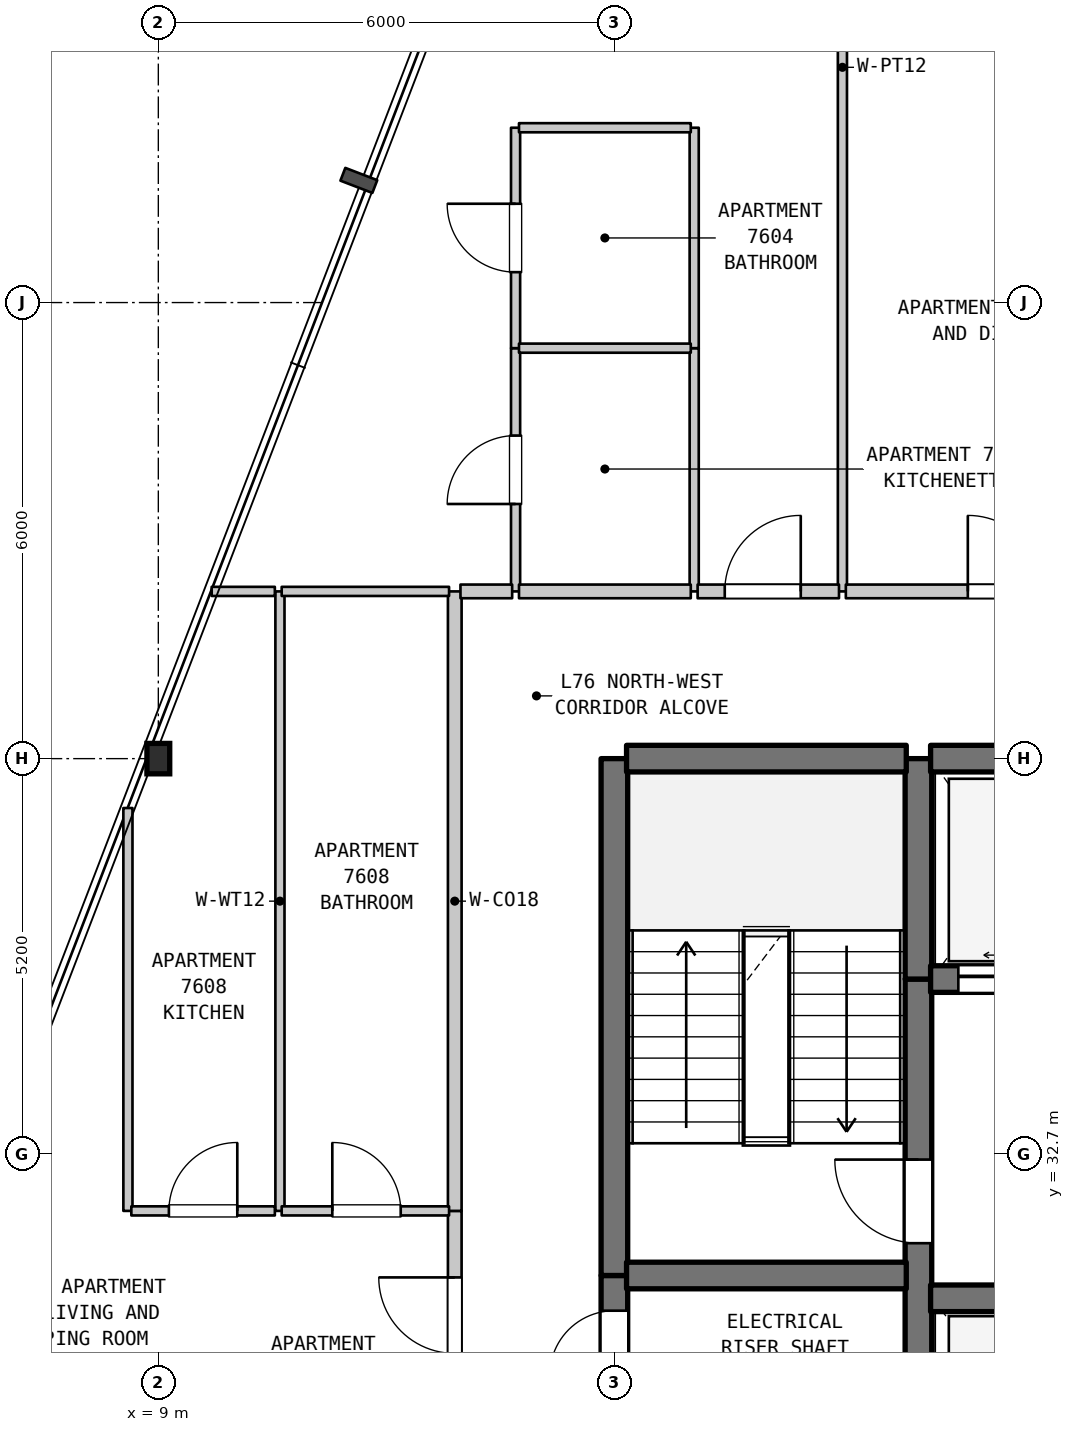
"""IFC4 building model, lengths in metres.
Left out: names, types, materials, properties, quantities, classifications, styles, units other than length and angle.
Written with IfcOpenShell. Run it as: python <this file> out.ifc"""

import sys

from ifc_helpers import new_model, si_unit, direction, frame, frame_2d, origin, origin_2d, place, context, subcontext, project, spatial, rectangle, i_section, extrude, element, fill, save


model = new_model("IFC4")
c1 = context("Model", 3, precision=1e-05, world=origin(), true_north=direction((0.0, 1.0)))
c2 = subcontext(c1, "Body", "Model", "MODEL_VIEW")
j1 = project(units=[si_unit("LENGTHUNIT", "METRE"), si_unit("PLANEANGLEUNIT", "RADIAN")], contexts=[c1])
p1 = place(None, origin())
s1 = spatial("IfcSite", under=j1, at=p1, CompositionType="ELEMENT")
p2 = place(p1, origin())
s2 = spatial("IfcBuilding", under=s1, at=p2, CompositionType="ELEMENT")
p3 = place(p2, frame((0.0, 0.0, 303.6)))
s3 = spatial("IfcBuildingStorey", under=s2, at=p3, CompositionType="ELEMENT", Elevation=303.6)
p4 = place(p3, frame((9.0, 37.9, 0.0), z_axis=(0.0, 0.0, 1.0), x_axis=(1.0, 0.0, 0.0)))
e1 = element("IfcColumn", 1, at=p4, inside=s3, PredefinedType="COLUMN", context=c2, shape_type="SweptSolid", body=[
    extrude(i_section(OverallWidth=0.3, OverallDepth=0.4, WebThickness=0.013, FlangeThickness=0.024, FilletRadius=0.027, at=origin_2d()), origin(), (0.0, 0.0, 1.0), 3.7),
])
p5 = place(p3, frame((8.6, 31.95, 0.0), z_axis=(0.0, 0.0, 1.0), x_axis=(0.0, 1.0, 0.0)))
e2 = element("IfcWall", 2, at=p5, inside=s3, PredefinedType="PARTITIONING", context=c2, shape_type="SweptSolid", body=[
    extrude(rectangle(XDim=5.3, YDim=0.12, at=frame_2d((2.65, 0.0))), origin(), (0.0, 0.0, 1.0), 3.39),
])
p6 = place(p3, frame((10.6, 31.95, 0.0), z_axis=(0.0, 0.0, 1.0), x_axis=(0.0, 1.0, 0.0)))
e3 = element("IfcWall", 3, at=p6, inside=s3, PredefinedType="PARTITIONING", context=c2, shape_type="SweptSolid", body=[
    extrude(rectangle(XDim=8.15, YDim=0.12, at=frame_2d((4.075, 0.0))), origin(), (0.0, 0.0, 1.0), 3.39),
])
p7 = place(p3, frame((12.9, 29.2, 0.0), z_axis=(0.0, 0.0, 1.0), x_axis=(0.0, 1.0, 0.0)))
e4 = element("IfcWall", 4, at=p7, inside=s3, PredefinedType="STANDARD", context=c2, shape_type="SweptSolid", body=[
    extrude(rectangle(XDim=2.75, YDim=0.18, at=frame_2d((1.375, 0.0))), origin(), (0.0, 0.0, 1.0), 3.39),
])
p8 = place(p7, frame((0.875, 0.0, 0.0)))
e5 = element("IfcOpeningElement", 5, at=p8, cuts=e4, PredefinedType="OPENING", context=c2, shape_type="SweptSolid", body=[
    extrude(rectangle(XDim=1.0, YDim=2.15, at=frame_2d((0.5, 1.075))), frame((0.0, 0.1, 0.0), z_axis=(0.0, -1.0, 0.0), x_axis=(1.0, 0.0, 0.0)), (0.0, 0.0, 1.0), 0.2),
])
p9 = place(p3, frame((12.9, 31.95, 0.0), z_axis=(0.0, 0.0, 1.0), x_axis=(0.0, 1.0, 0.0)))
e6 = element("IfcWall", 6, at=p9, inside=s3, PredefinedType="STANDARD", context=c2, shape_type="SweptSolid", body=[
    extrude(rectangle(XDim=8.15, YDim=0.18, at=frame_2d((4.075, 0.0))), origin(), (0.0, 0.0, 1.0), 3.39),
])
p10 = place(p3, frame((13.7, 40.1, 0.0), z_axis=(0.0, 0.0, 1.0), x_axis=(0.0, 1.0, 0.0)))
e7 = element("IfcWall", 7, at=p10, inside=s3, PredefinedType="PARTITIONING", context=c2, shape_type="SweptSolid", body=[
    extrude(rectangle(XDim=3.2, YDim=0.12, at=frame_2d((1.6, 0.0))), origin(), (0.0, 0.0, 1.0), 3.39),
])
p11 = place(p10, frame((1.15, 0.0, 0.0)))
e8 = element("IfcOpeningElement", 8, at=p11, cuts=e7, PredefinedType="OPENING", context=c2, shape_type="SweptSolid", body=[
    extrude(rectangle(XDim=0.9, YDim=2.15, at=frame_2d((0.45, 1.075))), frame((0.0, 0.07, 0.0), z_axis=(0.0, -1.0, 0.0), x_axis=(1.0, 0.0, 0.0)), (0.0, 0.0, 1.0), 0.14),
])
p12 = place(p3, frame((13.7, 43.3, 0.0), z_axis=(0.0, 0.0, 1.0), x_axis=(0.0, 1.0, 0.0)))
e9 = element("IfcWall", 9, at=p12, inside=s3, PredefinedType="PARTITIONING", context=c2, shape_type="SweptSolid", body=[
    extrude(rectangle(XDim=2.9, YDim=0.12, at=frame_2d((1.45, 0.0))), origin(), (0.0, 0.0, 1.0), 3.39),
])
p13 = place(p12, frame((1.0, 0.0, 0.0)))
e10 = element("IfcOpeningElement", 10, at=p13, cuts=e9, PredefinedType="OPENING", context=c2, shape_type="SweptSolid", body=[
    extrude(rectangle(XDim=0.9, YDim=2.1, at=frame_2d((0.45, 1.05))), frame((0.0, 0.07, 0.0), z_axis=(0.0, -1.0, 0.0), x_axis=(1.0, 0.0, 0.0)), (0.0, 0.0, 1.0), 0.14),
])
p14 = place(p3, frame((15.0, 29.5, 0.0), z_axis=(0.0, 0.0, 1.0), x_axis=(0.0, 1.0, 0.0)))
e11 = element("IfcWall", 11, at=p14, inside=s3, PredefinedType="SHEAR", context=c2, shape_type="SweptSolid", body=[
    extrude(rectangle(XDim=1.6, YDim=0.35, at=frame_2d((0.8, 0.0))), origin(), (0.0, 0.0, 1.0), 3.39),
])
p15 = place(p14, frame((0.287, 0.0, 0.0)))
e12 = element("IfcOpeningElement", 12, at=p15, cuts=e11, PredefinedType="OPENING", context=c2, shape_type="SweptSolid", body=[
    extrude(rectangle(XDim=0.85, YDim=2.1, at=frame_2d((0.425, 1.05))), frame((0.0, 0.185, 0.0), z_axis=(0.0, -1.0, 0.0), x_axis=(1.0, 0.0, 0.0)), (0.0, 0.0, 1.0), 0.37),
])
p16 = place(p3, frame((15.0, 31.1, 0.0), z_axis=(0.0, 0.0, 1.0), x_axis=(0.0, 1.0, 0.0)))
e13 = element("IfcWall", 13, at=p16, inside=s3, PredefinedType="SHEAR", context=c2, shape_type="SweptSolid", body=[
    extrude(rectangle(XDim=6.8, YDim=0.35, at=frame_2d((3.4, 0.0))), origin(), (0.0, 0.0, 1.0), 3.39),
])
p17 = place(p3, frame((16.05, 40.1, 0.0), z_axis=(0.0, 0.0, 1.0), x_axis=(0.0, 1.0, 0.0)))
e14 = element("IfcWall", 14, at=p17, inside=s3, PredefinedType="PARTITIONING", context=c2, shape_type="SweptSolid", body=[
    extrude(rectangle(XDim=3.2, YDim=0.12, at=frame_2d((1.6, 0.0))), origin(), (0.0, 0.0, 1.0), 3.39),
])
p18 = place(p3, frame((16.05, 43.3, 0.0), z_axis=(0.0, 0.0, 1.0), x_axis=(0.0, 1.0, 0.0)))
e15 = element("IfcWall", 15, at=p18, inside=s3, PredefinedType="PARTITIONING", context=c2, shape_type="SweptSolid", body=[
    extrude(rectangle(XDim=2.9, YDim=0.12, at=frame_2d((1.45, 0.0))), origin(), (0.0, 0.0, 1.0), 3.39),
])
p19 = place(p3, frame((18.0, 40.1, 0.0), z_axis=(0.0, 0.0, 1.0), x_axis=(0.0, 1.0, 0.0)))
e16 = element("IfcWall", 16, at=p19, inside=s3, PredefinedType="PARTITIONING", context=c2, shape_type="SweptSolid", body=[
    extrude(rectangle(XDim=13.79, YDim=0.12, at=frame_2d((6.895, 0.0))), origin(), (0.0, 0.0, 1.0), 3.39),
])
p20 = place(p3, frame((19.0, 29.5, 0.0), z_axis=(0.0, 0.0, 1.0), x_axis=(0.0, 1.0, 0.0)))
e17 = element("IfcWall", 17, at=p20, inside=s3, PredefinedType="SHEAR", context=c2, shape_type="SweptSolid", body=[
    extrude(rectangle(XDim=5.5, YDim=0.35, at=frame_2d((2.75, 0.0))), origin(), (0.0, 0.0, 1.0), 3.39),
])
p21 = place(p20, frame((2.025, 0.0, 0.0)))
e18 = element("IfcOpeningElement", 18, at=p21, cuts=e17, PredefinedType="OPENING", context=c2, shape_type="SweptSolid", body=[
    extrude(rectangle(XDim=1.1, YDim=2.15, at=frame_2d((0.55, 1.075))), frame((0.0, 0.185, 0.0), z_axis=(0.0, -1.0, 0.0), x_axis=(1.0, 0.0, 0.0)), (0.0, 0.0, 1.0), 0.37),
])
p22 = place(p3, frame((19.0, 35.0, 0.0), z_axis=(0.0, 0.0, 1.0), x_axis=(0.0, 1.0, 0.0)))
e19 = element("IfcWall", 19, at=p22, inside=s3, PredefinedType="SHEAR", context=c2, shape_type="SweptSolid", body=[
    extrude(rectangle(XDim=2.9, YDim=0.35, at=frame_2d((1.45, 0.0))), origin(), (0.0, 0.0, 1.0), 3.39),
])
p23 = place(p3, frame((19.16, 30.8, 0.0), z_axis=(0.0, 0.0, 1.0), x_axis=(1.0, 0.0, 0.0)))
e20 = element("IfcWall", 20, at=p23, inside=s3, PredefinedType="SHEAR", context=c2, shape_type="SweptSolid", body=[
    extrude(rectangle(XDim=4.48, YDim=0.35, at=frame_2d((2.24, 0.0))), origin(), (0.0, 0.0, 1.0), 3.39),
])
p24 = place(p3, frame((15.16, 31.1, 0.0), z_axis=(0.0, 0.0, 1.0), x_axis=(1.0, 0.0, 0.0)))
e21 = element("IfcWall", 21, at=p24, inside=s3, PredefinedType="SHEAR", context=c2, shape_type="SweptSolid", body=[
    extrude(rectangle(XDim=3.68, YDim=0.35, at=frame_2d((1.84, 0.0))), origin(), (0.0, 0.0, 1.0), 3.39),
])
p25 = place(p3, frame((8.645, 31.95, 0.0), z_axis=(0.0, 0.0, 1.0), x_axis=(1.0, 0.0, 0.0)))
e22 = element("IfcWall", 22, at=p25, inside=s3, PredefinedType="PARTITIONING", context=c2, shape_type="SweptSolid", body=[
    extrude(rectangle(XDim=1.888, YDim=0.12, at=frame_2d((0.944, 0.0))), origin(), (0.0, 0.0, 1.0), 3.39),
])
p26 = place(p25, frame((0.494, 0.0, 0.0)))
e23 = element("IfcOpeningElement", 23, at=p26, cuts=e22, PredefinedType="OPENING", context=c2, shape_type="SweptSolid", body=[
    extrude(rectangle(XDim=0.9, YDim=2.15, at=frame_2d((0.45, 1.075))), frame((0.0, 0.07, 0.0), z_axis=(0.0, -1.0, 0.0), x_axis=(1.0, 0.0, 0.0)), (0.0, 0.0, 1.0), 0.14),
])
p27 = place(p3, frame((10.623, 31.95, 0.0), z_axis=(0.0, 0.0, 1.0), x_axis=(1.0, 0.0, 0.0)))
e24 = element("IfcWall", 24, at=p27, inside=s3, PredefinedType="PARTITIONING", context=c2, shape_type="SweptSolid", body=[
    extrude(rectangle(XDim=2.202, YDim=0.12, at=frame_2d((1.101, 0.0))), origin(), (0.0, 0.0, 1.0), 3.39),
])
p28 = place(p27, frame((0.666, 0.0, 0.0)))
e25 = element("IfcOpeningElement", 25, at=p28, cuts=e24, PredefinedType="OPENING", context=c2, shape_type="SweptSolid", body=[
    extrude(rectangle(XDim=0.9, YDim=2.1, at=frame_2d((0.45, 1.05))), frame((0.0, 0.07, 0.0), z_axis=(0.0, -1.0, 0.0), x_axis=(1.0, 0.0, 0.0)), (0.0, 0.0, 1.0), 0.14),
])
p29 = place(p3, frame((19.16, 35.0, 0.0), z_axis=(0.0, 0.0, 1.0), x_axis=(1.0, 0.0, 0.0)))
e26 = element("IfcWall", 26, at=p29, inside=s3, PredefinedType="SHEAR", context=c2, shape_type="SweptSolid", body=[
    extrude(rectangle(XDim=4.48, YDim=0.35, at=frame_2d((2.24, 0.0))), origin(), (0.0, 0.0, 1.0), 3.39),
])
p30 = place(p29, frame((0.365, 0.0, 0.0)))
e27 = element("IfcOpeningElement", 27, at=p30, cuts=e26, PredefinedType="OPENING", context=c2, shape_type="SweptSolid", body=[
    extrude(rectangle(XDim=1.35, YDim=2.2, at=frame_2d((0.675, 1.1))), frame((0.0, 0.185, 0.0), z_axis=(0.0, -1.0, 0.0), x_axis=(1.0, 0.0, 0.0)), (0.0, 0.0, 1.0), 0.37),
])
p31 = place(p29, frame((2.765, 0.0, 0.0)))
e28 = element("IfcOpeningElement", 28, at=p31, cuts=e26, PredefinedType="OPENING", context=c2, shape_type="SweptSolid", body=[
    extrude(rectangle(XDim=1.35, YDim=2.2, at=frame_2d((0.675, 1.1))), frame((0.0, 0.185, 0.0), z_axis=(0.0, -1.0, 0.0), x_axis=(1.0, 0.0, 0.0)), (0.0, 0.0, 1.0), 0.37),
])
p32 = place(p3, frame((15.16, 37.9, 0.0), z_axis=(0.0, 0.0, 1.0), x_axis=(1.0, 0.0, 0.0)))
e29 = element("IfcWall", 29, at=p32, inside=s3, PredefinedType="SHEAR", context=c2, shape_type="SweptSolid", body=[
    extrude(rectangle(XDim=3.68, YDim=0.35, at=frame_2d((1.84, 0.0))), origin(), (0.0, 0.0, 1.0), 3.39),
])
p33 = place(p3, frame((19.16, 37.9, 0.0), z_axis=(0.0, 0.0, 1.0), x_axis=(1.0, 0.0, 0.0)))
e30 = element("IfcWall", 30, at=p33, inside=s3, PredefinedType="SHEAR", context=c2, shape_type="SweptSolid", body=[
    extrude(rectangle(XDim=4.48, YDim=0.35, at=frame_2d((2.24, 0.0))), origin(), (0.0, 0.0, 1.0), 3.39),
])
p34 = place(p3, frame((9.702, 40.1, 0.0), z_axis=(0.0, 0.0, 1.0), x_axis=(1.0, 0.0, 0.0)))
e31 = element("IfcWall", 31, at=p34, inside=s3, PredefinedType="PARTITIONING", context=c2, shape_type="SweptSolid", body=[
    extrude(rectangle(XDim=0.831, YDim=0.12, at=frame_2d((0.416, 0.0))), origin(), (0.0, 0.0, 1.0), 3.39),
])
p35 = place(p3, frame((10.623, 40.1, 0.0), z_axis=(0.0, 0.0, 1.0), x_axis=(1.0, 0.0, 0.0)))
e32 = element("IfcWall", 32, at=p35, inside=s3, PredefinedType="PARTITIONING", context=c2, shape_type="SweptSolid", body=[
    extrude(rectangle(XDim=2.202, YDim=0.12, at=frame_2d((1.101, 0.0))), origin(), (0.0, 0.0, 1.0), 3.39),
])
p36 = place(p3, frame((12.975, 40.1, 0.0), z_axis=(0.0, 0.0, 1.0), x_axis=(1.0, 0.0, 0.0)))
e33 = element("IfcWall", 33, at=p36, inside=s3, PredefinedType="STANDARD", context=c2, shape_type="SweptSolid", body=[
    extrude(rectangle(XDim=0.68, YDim=0.18, at=frame_2d((0.34, 0.0))), origin(), (0.0, 0.0, 1.0), 3.39),
])
p37 = place(p3, frame((13.745, 40.1, 0.0), z_axis=(0.0, 0.0, 1.0), x_axis=(1.0, 0.0, 0.0)))
e34 = element("IfcWall", 34, at=p37, inside=s3, PredefinedType="STANDARD", context=c2, shape_type="SweptSolid", body=[
    extrude(rectangle(XDim=2.26, YDim=0.18, at=frame_2d((1.13, 0.0))), origin(), (0.0, 0.0, 1.0), 3.39),
])
p38 = place(p3, frame((16.095, 40.1, 0.0), z_axis=(0.0, 0.0, 1.0), x_axis=(1.0, 0.0, 0.0)))
e35 = element("IfcWall", 35, at=p38, inside=s3, PredefinedType="STANDARD", context=c2, shape_type="SweptSolid", body=[
    extrude(rectangle(XDim=1.86, YDim=0.18, at=frame_2d((0.93, 0.0))), origin(), (0.0, 0.0, 1.0), 3.39),
])
p39 = place(p38, frame((0.357, 0.0, 0.0)))
e36 = element("IfcOpeningElement", 36, at=p39, cuts=e35, PredefinedType="OPENING", context=c2, shape_type="SweptSolid", body=[
    extrude(rectangle(XDim=1.0, YDim=2.15, at=frame_2d((0.5, 1.075))), frame((0.0, 0.1, 0.0), z_axis=(0.0, -1.0, 0.0), x_axis=(1.0, 0.0, 0.0)), (0.0, 0.0, 1.0), 0.2),
])
p40 = place(p3, frame((18.045, 40.1, 0.0), z_axis=(0.0, 0.0, 1.0), x_axis=(1.0, 0.0, 0.0)))
e37 = element("IfcWall", 37, at=p40, inside=s3, PredefinedType="STANDARD", context=c2, shape_type="SweptSolid", body=[
    extrude(rectangle(XDim=4.21, YDim=0.18, at=frame_2d((2.105, 0.0))), origin(), (0.0, 0.0, 1.0), 3.39),
])
p41 = place(p40, frame((1.605, 0.0, 0.0)))
e38 = element("IfcOpeningElement", 38, at=p41, cuts=e37, PredefinedType="OPENING", context=c2, shape_type="SweptSolid", body=[
    extrude(rectangle(XDim=1.0, YDim=2.15, at=frame_2d((0.5, 1.075))), frame((0.0, 0.1, 0.0), z_axis=(0.0, -1.0, 0.0), x_axis=(1.0, 0.0, 0.0)), (0.0, 0.0, 1.0), 0.2),
])
for number, where, z_axis, x_axis in (
    (39, (13.745, 43.3, 0.0), (0.0, 0.0, 1.0), (1.0, 0.0, 0.0)),
    (40, (13.745, 46.2, 0.0), (0.0, 0.0, 1.0), (1.0, 0.0, 0.0)),
):
    element("IfcWall", number, at=place(p3, frame(where, z_axis=z_axis, x_axis=x_axis)), inside=s3, PredefinedType="PARTITIONING", context=c2, shape_type="SweptSolid", body=[
        extrude(rectangle(XDim=2.26, YDim=0.12, at=frame_2d((1.13, 0.0))), origin(), (0.0, 0.0, 1.0), 3.39),
    ])
p42 = place(p8, origin())
e41 = element("IfcDoor", 41, at=p42, inside=s3, OperationType="SINGLE_SWING_RIGHT", PredefinedType="DOOR", context=c2, shape_type="SweptSolid", body=[
    extrude(rectangle(XDim=1.0, YDim=2.15, at=frame_2d((0.5, 1.075))), frame((0.0, 0.025, 0.0), z_axis=(0.0, -1.0, 0.0), x_axis=(1.0, 0.0, 0.0)), (0.0, 0.0, 1.0), 0.05),
])
fill(e5, e41)
p43 = place(p11, origin())
e42 = element("IfcDoor", 42, at=p43, inside=s3, OperationType="SINGLE_SWING_LEFT", PredefinedType="DOOR", context=c2, shape_type="SweptSolid", body=[
    extrude(rectangle(XDim=0.9, YDim=2.15, at=frame_2d((0.45, 1.075))), frame((0.0, 0.025, 0.0), z_axis=(0.0, -1.0, 0.0), x_axis=(1.0, 0.0, 0.0)), (0.0, 0.0, 1.0), 0.05),
])
fill(e8, e42)
p44 = place(p13, origin())
e43 = element("IfcDoor", 43, at=p44, inside=s3, OperationType="SINGLE_SWING_RIGHT", PredefinedType="DOOR", context=c2, shape_type="SweptSolid", body=[
    extrude(rectangle(XDim=0.9, YDim=2.1, at=frame_2d((0.45, 1.05))), frame((0.0, 0.025, 0.0), z_axis=(0.0, -1.0, 0.0), x_axis=(1.0, 0.0, 0.0)), (0.0, 0.0, 1.0), 0.05),
])
fill(e10, e43)
p45 = place(p15, origin())
e44 = element("IfcDoor", 44, at=p45, inside=s3, OperationType="SINGLE_SWING_LEFT", PredefinedType="DOOR", context=c2, shape_type="SweptSolid", body=[
    extrude(rectangle(XDim=0.85, YDim=2.1, at=frame_2d((0.425, 1.05))), frame((0.0, 0.025, 0.0), z_axis=(0.0, -1.0, 0.0), x_axis=(1.0, 0.0, 0.0)), (0.0, 0.0, 1.0), 0.05),
])
fill(e12, e44)
p46 = place(p21, origin())
e45 = element("IfcDoor", 45, at=p46, inside=s3, OperationType="SINGLE_SWING_RIGHT", PredefinedType="DOOR", context=c2, shape_type="SweptSolid", body=[
    extrude(rectangle(XDim=1.1, YDim=2.15, at=frame_2d((0.55, 1.075))), frame((0.0, 0.025, 0.0), z_axis=(0.0, -1.0, 0.0), x_axis=(1.0, 0.0, 0.0)), (0.0, 0.0, 1.0), 0.05),
])
fill(e18, e45)
p47 = place(p26, origin())
e46 = element("IfcDoor", 46, at=p47, inside=s3, OperationType="SINGLE_SWING_RIGHT", PredefinedType="DOOR", context=c2, shape_type="SweptSolid", body=[
    extrude(rectangle(XDim=0.9, YDim=2.15, at=frame_2d((0.45, 1.075))), frame((0.0, 0.025, 0.0), z_axis=(0.0, -1.0, 0.0), x_axis=(1.0, 0.0, 0.0)), (0.0, 0.0, 1.0), 0.05),
])
fill(e23, e46)
p48 = place(p28, origin())
e47 = element("IfcDoor", 47, at=p48, inside=s3, OperationType="SINGLE_SWING_LEFT", PredefinedType="DOOR", context=c2, shape_type="SweptSolid", body=[
    extrude(rectangle(XDim=0.9, YDim=2.1, at=frame_2d((0.45, 1.05))), frame((0.0, 0.025, 0.0), z_axis=(0.0, -1.0, 0.0), x_axis=(1.0, 0.0, 0.0)), (0.0, 0.0, 1.0), 0.05),
])
fill(e25, e47)
p49 = place(p30, origin())
e48 = element("IfcDoor", 48, at=p49, inside=s3, OperationType="DOUBLE_DOOR_SLIDING", PredefinedType="DOOR", context=c2, shape_type="SweptSolid", body=[
    extrude(rectangle(XDim=1.35, YDim=2.2, at=frame_2d((0.675, 1.1))), frame((0.0, 0.025, 0.0), z_axis=(0.0, -1.0, 0.0), x_axis=(1.0, 0.0, 0.0)), (0.0, 0.0, 1.0), 0.05),
])
fill(e27, e48)
p50 = place(p39, origin())
e49 = element("IfcDoor", 49, at=p50, inside=s3, OperationType="SINGLE_SWING_RIGHT", PredefinedType="DOOR", context=c2, shape_type="SweptSolid", body=[
    extrude(rectangle(XDim=1.0, YDim=2.15, at=frame_2d((0.5, 1.075))), frame((0.0, 0.025, 0.0), z_axis=(0.0, -1.0, 0.0), x_axis=(1.0, 0.0, 0.0)), (0.0, 0.0, 1.0), 0.05),
])
fill(e36, e49)
p51 = place(p41, origin())
e50 = element("IfcDoor", 50, at=p51, inside=s3, OperationType="SINGLE_SWING_LEFT", PredefinedType="DOOR", context=c2, shape_type="SweptSolid", body=[
    extrude(rectangle(XDim=1.0, YDim=2.15, at=frame_2d((0.5, 1.075))), frame((0.0, 0.025, 0.0), z_axis=(0.0, -1.0, 0.0), x_axis=(1.0, 0.0, 0.0)), (0.0, 0.0, 1.0), 0.05),
])
fill(e38, e50)
save(model, sys.argv[1])
